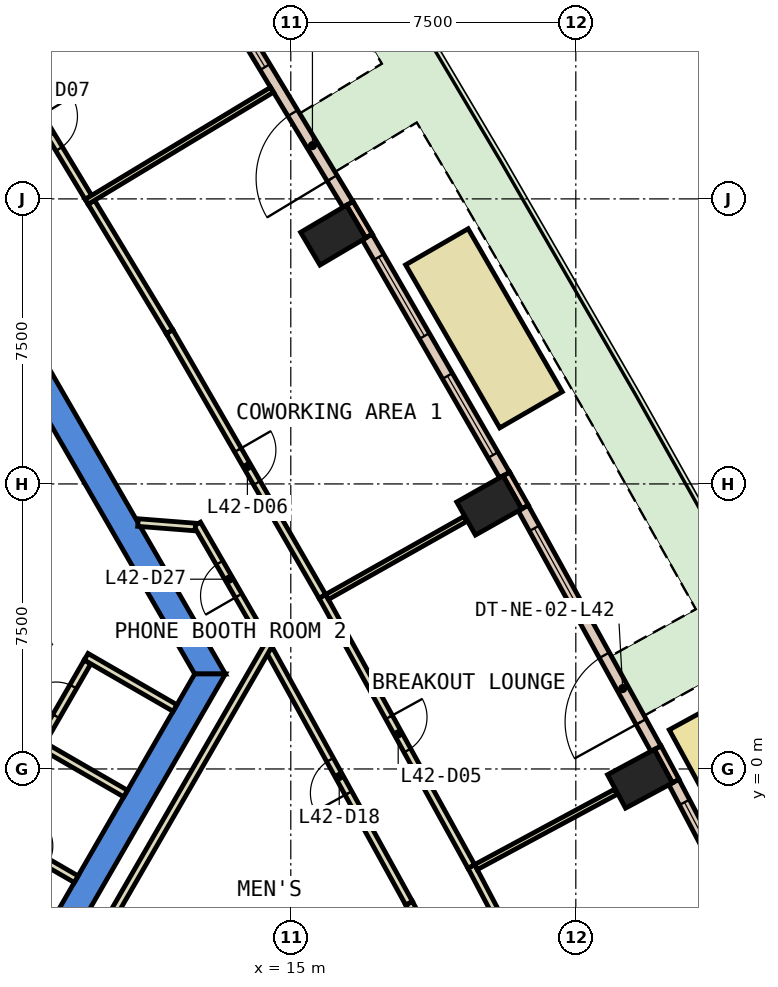
"""IFC4 building model, lengths in metres.
Left out: names, types, materials, properties, quantities, classifications, styles, units other than length and angle.
Written with IfcOpenShell. Run it as: python <this file> out.ifc"""

import sys

from ifc_helpers import new_model, si_unit, direction, frame, frame_2d, origin, origin_2d, place, context, subcontext, project, spatial, polyline, rectangle, outline, extrude, element, fill, save


model = new_model("IFC4")
c1 = context("Model", 3, precision=1e-05, world=origin(), true_north=direction((0.0, 1.0)))
c2 = subcontext(c1, "Body", "Model", "MODEL_VIEW")
j1 = project(units=[si_unit("LENGTHUNIT", "METRE"), si_unit("PLANEANGLEUNIT", "RADIAN")], contexts=[c1])
p1 = place(None, origin())
s1 = spatial("IfcSite", under=j1, at=p1, CompositionType="ELEMENT")
p2 = place(p1, origin())
s2 = spatial("IfcBuilding", under=s1, at=p2, CompositionType="ELEMENT")
p3 = place(p2, frame((0.0, 0.0, 189.8)))
s3 = spatial("IfcBuildingStorey", under=s2, at=p3, CompositionType="ELEMENT", Elevation=189.8)
for number, where, z_axis, x_axis in (
    (1, (24.188, -0.259, 0.0), (0.0, 0.0, 1.0), (-0.474, 0.88, 0.0)),
    (2, (20.222, 6.934, 0.0), (0.0, 0.0, 1.0), (-0.491, 0.871, 0.0)),
    (3, (16.116, 14.046, 0.0), (0.0, 0.0, 1.0), (-0.509, 0.861, 0.0)),
):
    element("IfcColumn", number, at=place(p3, frame(where, z_axis=z_axis, x_axis=x_axis)), inside=s3, PredefinedType="COLUMN", context=c2, shape_type="SweptSolid", body=[
        extrude(rectangle(XDim=1.0, YDim=1.4, at=origin_2d()), origin(), (0.0, 0.0, 1.0), 3.8),
    ])
p4 = place(p3, frame((0.0, 0.0, -0.6)))
e4 = element("IfcWall", 4, at=p4, inside=s3, PredefinedType="SHEAR", context=c2, shape_type="SweptSolid", body=[
    extrude(outline(polyline([(8.084, 11.498), (7.478, 11.148), (12.471, 2.5), (13.279, 2.5), (8.084, 11.498)])), origin(), (0.0, 0.0, 1.0), 4.4),
])
p5 = place(p3, frame((0.0, 0.0, -0.6)))
e5 = element("IfcWall", 5, at=p5, inside=s3, PredefinedType="SHEAR", context=c2, shape_type="SweptSolid", body=[
    extrude(outline(polyline([(6.64, -9.0), (13.279, 2.5), (12.471, 2.5), (6.235, -8.3), (6.64, -9.0)])), origin(), (0.0, 0.0, 1.0), 4.4),
])
p6 = place(p3, frame((25.129, -0.32, 0.0), z_axis=(0.0, 0.0, 1.0), x_axis=(-0.473663196434, 0.88070606694, 0.0)))
e6 = element("IfcWall", 6, at=p6, inside=s3, PredefinedType="STANDARD", context=c2, shape_type="SweptSolid", body=[
    extrude(rectangle(XDim=1.0, YDim=0.2, at=frame_2d((0.5, 0.0))), origin(), (0.0, 0.0, 1.0), 3.8),
])
p7 = place(p3, frame((21.165, 6.891, 0.0), z_axis=(0.0, 0.0, 1.0), x_axis=(-0.491848119507, 0.870681013539, 0.0)))
e7 = element("IfcWall", 7, at=p7, inside=s3, PredefinedType="STANDARD", context=c2, shape_type="SweptSolid", body=[
    extrude(rectangle(XDim=1.0, YDim=0.2, at=frame_2d((0.5, 0.0))), origin(), (0.0, 0.0, 1.0), 3.8),
])
p8 = place(p3, frame((17.059, 14.023, 0.0), z_axis=(0.0, 0.0, 1.0), x_axis=(-0.508161541526, 0.861261776531, 0.0)))
e8 = element("IfcWall", 8, at=p8, inside=s3, PredefinedType="STANDARD", context=c2, shape_type="SweptSolid", body=[
    extrude(rectangle(XDim=1.0, YDim=0.2, at=frame_2d((0.5, 0.0))), origin(), (0.0, 0.0, 1.0), 3.8),
])
p9 = place(p3, frame((28.435, -6.724, 0.0), z_axis=(0.0, 0.0, 1.0), x_axis=(-0.465478369088, 0.885059256723, 0.0)))
e9 = element("IfcWall", 9, at=p9, inside=s3, PredefinedType="STANDARD", context=c2, shape_type="SweptSolid", body=[
    extrude(rectangle(XDim=7.208, YDim=0.3, at=frame_2d((3.604, 0.0))), origin(), (0.0, 0.0, 1.0), 3.8),
])
p10 = place(p9, frame((0.602, 0.0, 0.9)))
e10 = element("IfcOpeningElement", 10, at=p10, cuts=e9, PredefinedType="OPENING", context=c2, shape_type="SweptSolid", body=[
    extrude(rectangle(XDim=2.4, YDim=2.6, at=frame_2d((1.2, 1.3))), frame((0.0, 0.16, 0.0), z_axis=(0.0, -1.0, 0.0), x_axis=(1.0, 0.0, 0.0)), (0.0, 0.0, 1.0), 0.32),
])
p11 = place(p9, frame((4.206, 0.0, 0.9)))
e11 = element("IfcOpeningElement", 11, at=p11, cuts=e9, PredefinedType="OPENING", context=c2, shape_type="SweptSolid", body=[
    extrude(rectangle(XDim=2.4, YDim=2.6, at=frame_2d((1.2, 1.3))), frame((0.0, 0.16, 0.0), z_axis=(0.0, -1.0, 0.0), x_axis=(1.0, 0.0, 0.0)), (0.0, 0.0, 1.0), 0.32),
])
p12 = place(p3, frame((24.607, 0.534, 0.0), z_axis=(0.0, 0.0, 1.0), x_axis=(-0.482862185961, 0.875696356832, 0.0)))
e12 = element("IfcWall", 12, at=p12, inside=s3, PredefinedType="STANDARD", context=c2, shape_type="SweptSolid", body=[
    extrude(rectangle(XDim=7.23, YDim=0.3, at=frame_2d((3.615, 0.0))), origin(), (0.0, 0.0, 1.0), 3.8),
])
p13 = place(p12, frame((0.807, 0.0, 0.0)))
e13 = element("IfcOpeningElement", 13, at=p13, cuts=e12, PredefinedType="OPENING", context=c2, shape_type="SweptSolid", body=[
    extrude(rectangle(XDim=2.0, YDim=2.4, at=frame_2d((1.0, 1.2))), frame((0.0, 0.16, 0.0), z_axis=(0.0, -1.0, 0.0), x_axis=(1.0, 0.0, 0.0)), (0.0, 0.0, 1.0), 0.32),
])
p14 = place(p12, frame((4.222, 0.0, 0.9)))
e14 = element("IfcOpeningElement", 14, at=p14, cuts=e12, PredefinedType="OPENING", context=c2, shape_type="SweptSolid", body=[
    extrude(rectangle(XDim=2.4, YDim=2.6, at=frame_2d((1.2, 1.3))), frame((0.0, 0.16, 0.0), z_axis=(0.0, -1.0, 0.0), x_axis=(1.0, 0.0, 0.0)), (0.0, 0.0, 1.0), 0.32),
])
p15 = place(p3, frame((20.626, 7.734, 0.0), z_axis=(0.0, 0.0, 1.0), x_axis=(-0.499948481376, 0.866055146033, 0.0)))
e15 = element("IfcWall", 15, at=p15, inside=s3, PredefinedType="STANDARD", context=c2, shape_type="SweptSolid", body=[
    extrude(rectangle(XDim=7.231, YDim=0.3, at=frame_2d((3.615, 0.0))), origin(), (0.0, 0.0, 1.0), 3.8),
])
p16 = place(p15, frame((0.608, 0.0, 0.9)))
e16 = element("IfcOpeningElement", 16, at=p16, cuts=e15, PredefinedType="OPENING", context=c2, shape_type="SweptSolid", body=[
    extrude(rectangle(XDim=2.4, YDim=2.6, at=frame_2d((1.2, 1.3))), frame((0.0, 0.16, 0.0), z_axis=(0.0, -1.0, 0.0), x_axis=(1.0, 0.0, 0.0)), (0.0, 0.0, 1.0), 0.32),
])
p17 = place(p15, frame((4.223, 0.0, 0.9)))
e17 = element("IfcOpeningElement", 17, at=p17, cuts=e15, PredefinedType="OPENING", context=c2, shape_type="SweptSolid", body=[
    extrude(rectangle(XDim=2.4, YDim=2.6, at=frame_2d((1.2, 1.3))), frame((0.0, 0.16, 0.0), z_axis=(0.0, -1.0, 0.0), x_axis=(1.0, 0.0, 0.0)), (0.0, 0.0, 1.0), 0.32),
])
p18 = place(p3, frame((16.504, 14.855, 0.0), z_axis=(0.0, 0.0, 1.0), x_axis=(-0.517159962006, 0.855888762456, 0.0)))
e18 = element("IfcWall", 18, at=p18, inside=s3, PredefinedType="STANDARD", context=c2, shape_type="SweptSolid", body=[
    extrude(rectangle(XDim=7.23, YDim=0.3, at=frame_2d((3.615, 0.0))), origin(), (0.0, 0.0, 1.0), 3.8),
])
p19 = place(p18, frame((0.807, 0.0, 0.0)))
e19 = element("IfcOpeningElement", 19, at=p19, cuts=e18, PredefinedType="OPENING", context=c2, shape_type="SweptSolid", body=[
    extrude(rectangle(XDim=2.0, YDim=2.4, at=frame_2d((1.0, 1.2))), frame((0.0, 0.16, 0.0), z_axis=(0.0, -1.0, 0.0), x_axis=(1.0, 0.0, 0.0)), (0.0, 0.0, 1.0), 0.32),
])
p20 = place(p18, frame((4.222, 0.0, 0.9)))
e20 = element("IfcOpeningElement", 20, at=p20, cuts=e18, PredefinedType="OPENING", context=c2, shape_type="SweptSolid", body=[
    extrude(rectangle(XDim=2.4, YDim=2.6, at=frame_2d((1.2, 1.3))), frame((0.0, 0.16, 0.0), z_axis=(0.0, -1.0, 0.0), x_axis=(1.0, 0.0, 0.0)), (0.0, 0.0, 1.0), 0.32),
])
p21 = place(p3, frame((28.168, -2.861, 0.0), z_axis=(0.0, 0.0, 1.0), x_axis=(-0.479445954257, 0.87757140846, 0.0)))
e21 = element("IfcWall", 21, at=p21, inside=s3, PredefinedType="STANDARD", context=c2, shape_type="SweptSolid", body=[
    extrude(rectangle(XDim=4.954, YDim=1.9, at=frame_2d((2.477, 0.0))), origin(), (0.0, 0.0, 1.0), 0.8),
])
p22 = place(p3, frame((21.321, 9.45, 0.0), z_axis=(0.0, 0.0, 1.0), x_axis=(-0.500029609304, 0.86600830817, 0.0)))
e22 = element("IfcWall", 22, at=p22, inside=s3, PredefinedType="STANDARD", context=c2, shape_type="SweptSolid", body=[
    extrude(rectangle(XDim=4.954, YDim=1.9, at=frame_2d((2.477, 0.0))), origin(), (0.0, 0.0, 1.0), 0.8),
])
p23 = place(p3, frame((14.213, 3.543, 0.0), z_axis=(0.0, 0.0, 1.0), x_axis=(-0.500182898346, 0.865919781621, 0.0)))
e23 = element("IfcWall", 23, at=p23, inside=s3, PredefinedType="PARTITIONING", context=c2, shape_type="SweptSolid", body=[
    extrude(rectangle(XDim=3.35, YDim=0.2, at=frame_2d((1.675, 0.0))), origin(), (0.0, 0.0, 1.0), 3.8),
])
p24 = place(p23, frame((1.175, 0.0, 0.0)))
e24 = element("IfcOpeningElement", 24, at=p24, cuts=e23, PredefinedType="OPENING", context=c2, shape_type="SweptSolid", body=[
    extrude(rectangle(XDim=1.0, YDim=2.1, at=frame_2d((0.5, 1.05))), frame((0.0, 0.11, 0.0), z_axis=(0.0, -1.0, 0.0), x_axis=(1.0, 0.0, 0.0)), (0.0, 0.0, 1.0), 0.22),
])
p25 = place(p3, frame((12.488, 6.366, 0.0), z_axis=(0.0, 0.0, 1.0), x_axis=(-0.996960771308, 0.077905201835, 0.0)))
e25 = element("IfcWall", 25, at=p25, inside=s3, PredefinedType="PARTITIONING", context=c2, shape_type="SweptSolid", body=[
    extrude(rectangle(XDim=1.514, YDim=0.2, at=frame_2d((0.757, 0.0))), origin(), (0.0, 0.0, 1.0), 3.8),
])
p26 = place(p3, frame((18.836, -4.906, 0.0), z_axis=(0.0, 0.0, 1.0), x_axis=(-0.465843561357, 0.884867095299, 0.0)))
e26 = element("IfcWall", 26, at=p26, inside=s3, PredefinedType="PARTITIONING", context=c2, shape_type="SweptSolid", body=[
    extrude(rectangle(XDim=1.554, YDim=0.2, at=frame_2d((0.777, 0.0))), origin(), (0.0, 0.0, 1.0), 3.8),
])
p27 = place(p3, frame((18.112, -3.531, 0.0), z_axis=(0.0, 0.0, 1.0), x_axis=(-0.482800061144, 0.875730609811, 0.0)))
e27 = element("IfcWall", 27, at=p27, inside=s3, PredefinedType="PARTITIONING", context=c2, shape_type="SweptSolid", body=[
    extrude(rectangle(XDim=7.612, YDim=0.2, at=frame_2d((3.806, 0.0))), origin(), (0.0, 0.0, 1.0), 3.8),
])
p28 = place(p27, frame((3.306, 0.0, 0.0)))
e28 = element("IfcOpeningElement", 28, at=p28, cuts=e27, PredefinedType="OPENING", context=c2, shape_type="SweptSolid", body=[
    extrude(rectangle(XDim=1.0, YDim=2.1, at=frame_2d((0.5, 1.05))), frame((0.0, 0.11, 0.0), z_axis=(0.0, -1.0, 0.0), x_axis=(1.0, 0.0, 0.0)), (0.0, 0.0, 1.0), 0.22),
])
p29 = place(p3, frame((19.75, -2.563, 0.0), z_axis=(0.0, 0.0, 1.0), x_axis=(0.465444987791, -0.885076812113, 0.0)))
e29 = element("IfcWall", 29, at=p29, inside=s3, PredefinedType="PARTITIONING", context=c2, shape_type="SweptSolid", body=[
    extrude(rectangle(XDim=7.578, YDim=0.2, at=frame_2d((3.789, 0.0))), origin(), (0.0, 0.0, 1.0), 3.8),
])
p30 = place(p29, frame((3.289, 0.0, 0.0)))
e30 = element("IfcOpeningElement", 30, at=p30, cuts=e29, PredefinedType="OPENING", context=c2, shape_type="SweptSolid", body=[
    extrude(rectangle(XDim=1.0, YDim=2.1, at=frame_2d((0.5, 1.05))), frame((0.0, 0.11, 0.0), z_axis=(0.0, -1.0, 0.0), x_axis=(1.0, 0.0, 0.0)), (0.0, 0.0, 1.0), 0.22),
])
p31 = place(p3, frame((15.831, 4.542, 0.0), z_axis=(0.0, 0.0, 1.0), x_axis=(0.482835531749, -0.875711053533, 0.0)))
e31 = element("IfcWall", 31, at=p31, inside=s3, PredefinedType="PARTITIONING", context=c2, shape_type="SweptSolid", body=[
    extrude(rectangle(XDim=8.115, YDim=0.2, at=frame_2d((4.057, 0.0))), origin(), (0.0, 0.0, 1.0), 3.8),
])
p32 = place(p31, frame((3.632, 0.0, 0.0)))
e32 = element("IfcOpeningElement", 32, at=p32, cuts=e31, PredefinedType="OPENING", context=c2, shape_type="SweptSolid", body=[
    extrude(rectangle(XDim=1.0, YDim=2.1, at=frame_2d((0.5, 1.05))), frame((0.0, 0.11, 0.0), z_axis=(0.0, -1.0, 0.0), x_axis=(1.0, 0.0, 0.0)), (0.0, 0.0, 1.0), 0.22),
])
p33 = place(p3, frame((9.752, 14.911, 0.0), z_axis=(0.0, 0.0, 1.0), x_axis=(0.517135291957, -0.855903668535, 0.0)))
e33 = element("IfcWall", 33, at=p33, inside=s3, PredefinedType="PARTITIONING", context=c2, shape_type="SweptSolid", body=[
    extrude(rectangle(XDim=3.982, YDim=0.2, at=frame_2d((1.991, 0.0))), origin(), (0.0, 0.0, 1.0), 3.8),
])
p34 = place(p3, frame((11.811, 11.503, 0.0), z_axis=(0.0, 0.0, 1.0), x_axis=(0.500013420409, -0.866017655369, 0.0)))
e34 = element("IfcWall", 34, at=p34, inside=s3, PredefinedType="PARTITIONING", context=c2, shape_type="SweptSolid", body=[
    extrude(rectangle(XDim=8.038, YDim=0.2, at=frame_2d((4.019, 0.0))), origin(), (0.0, 0.0, 1.0), 3.8),
])
p35 = place(p34, frame((3.594, 0.0, 0.0)))
e35 = element("IfcOpeningElement", 35, at=p35, cuts=e34, PredefinedType="OPENING", context=c2, shape_type="SweptSolid", body=[
    extrude(rectangle(XDim=1.0, YDim=2.1, at=frame_2d((0.5, 1.05))), frame((0.0, 0.11, 0.0), z_axis=(0.0, -1.0, 0.0), x_axis=(1.0, 0.0, 0.0)), (0.0, 0.0, 1.0), 0.22),
])
p36 = place(p3, frame((7.615, 18.449, 0.0), z_axis=(0.0, 0.0, 1.0), x_axis=(0.516918251554, -0.856034766356, 0.0)))
e36 = element("IfcWall", 36, at=p36, inside=s3, PredefinedType="PARTITIONING", context=c2, shape_type="SweptSolid", body=[
    extrude(rectangle(XDim=3.983, YDim=0.2, at=frame_2d((1.992, 0.0))), origin(), (0.0, 0.0, 1.0), 3.8),
])
p37 = place(p36, frame((1.492, 0.0, 0.0)))
e37 = element("IfcOpeningElement", 37, at=p37, cuts=e36, PredefinedType="OPENING", context=c2, shape_type="SweptSolid", body=[
    extrude(rectangle(XDim=1.0, YDim=2.1, at=frame_2d((0.5, 1.05))), frame((0.0, 0.11, 0.0), z_axis=(0.0, -1.0, 0.0), x_axis=(1.0, 0.0, 0.0)), (0.0, 0.0, 1.0), 0.22),
])
p38 = place(p3, frame((7.188, -1.65, 0.0), z_axis=(0.0, 0.0, 1.0), x_axis=(0.866022959057, -0.500004234368, 0.0)))
e38 = element("IfcWall", 38, at=p38, inside=s3, PredefinedType="PARTITIONING", context=c2, shape_type="SweptSolid", body=[
    extrude(rectangle(XDim=2.5, YDim=0.2, at=frame_2d((1.25, 0.0))), origin(), (0.0, 0.0, 1.0), 3.8),
])
p39 = place(p38, frame((0.75, 0.0, 0.0)))
e39 = element("IfcOpeningElement", 39, at=p39, cuts=e38, PredefinedType="OPENING", context=c2, shape_type="SweptSolid", body=[
    extrude(rectangle(XDim=0.9, YDim=2.1, at=frame_2d((0.45, 1.05))), frame((0.0, 0.11, 0.0), z_axis=(0.0, -1.0, 0.0), x_axis=(1.0, 0.0, 0.0)), (0.0, 0.0, 1.0), 0.22),
])
p40 = place(p3, frame((10.653, -0.648, 0.0), z_axis=(0.0, 0.0, 1.0), x_axis=(-0.866036505625, 0.499980770555, 0.0)))
e40 = element("IfcWall", 40, at=p40, inside=s3, PredefinedType="PARTITIONING", context=c2, shape_type="SweptSolid", body=[
    extrude(rectangle(XDim=2.7, YDim=0.2, at=frame_2d((1.35, 0.0))), origin(), (0.0, 0.0, 1.0), 3.8),
])
p41 = place(p3, frame((8.451, 0.738, 0.0), z_axis=(0.0, 0.0, 1.0), x_axis=(0.499913221443, 0.866075499611, 0.0)))
e41 = element("IfcWall", 41, at=p41, inside=s3, PredefinedType="PARTITIONING", context=c2, shape_type="SweptSolid", body=[
    extrude(rectangle(XDim=2.4, YDim=0.2, at=frame_2d((1.2, 0.0))), origin(), (0.0, 0.0, 1.0), 3.8),
])
p42 = place(p41, frame((0.75, 0.0, 0.0)))
e42 = element("IfcOpeningElement", 42, at=p42, cuts=e41, PredefinedType="OPENING", context=c2, shape_type="SweptSolid", body=[
    extrude(rectangle(XDim=0.9, YDim=2.1, at=frame_2d((0.45, 1.05))), frame((0.0, 0.11, 0.0), z_axis=(0.0, -1.0, 0.0), x_axis=(1.0, 0.0, 0.0)), (0.0, 0.0, 1.0), 0.22),
])
p43 = place(p3, frame((9.615, 2.953, 0.0), z_axis=(0.0, 0.0, 1.0), x_axis=(0.866013897511, -0.50001992892, 0.0)))
e43 = element("IfcWall", 43, at=p43, inside=s3, PredefinedType="PARTITIONING", context=c2, shape_type="SweptSolid", body=[
    extrude(rectangle(XDim=2.7, YDim=0.2, at=frame_2d((1.35, 0.0))), origin(), (0.0, 0.0, 1.0), 3.8),
])
p44 = place(p3, frame((9.781, -4.758, 0.0), z_axis=(0.0, 0.0, 1.0), x_axis=(0.50003174578, 0.866007074574, 0.0)))
e44 = element("IfcWall", 44, at=p44, inside=s3, PredefinedType="PARTITIONING", context=c2, shape_type="SweptSolid", body=[
    extrude(rectangle(XDim=9.315, YDim=0.2, at=frame_2d((4.658, 0.0))), origin(), (0.0, 0.0, 1.0), 3.8),
])
p45 = place(p3, frame((19.873, -2.582, 0.0), z_axis=(0.0, 0.0, 1.0), x_axis=(0.880480475723, 0.474082410421, 0.0)))
e45 = element("IfcWall", 45, at=p45, inside=s3, PredefinedType="PARTITIONING", context=c2, shape_type="SweptSolid", body=[
    extrude(rectangle(XDim=4.181, YDim=0.15, at=frame_2d((2.09, 0.0))), origin(), (0.0, 0.0, 1.0), 3.8),
])
p46 = place(p3, frame((15.954, 4.526, 0.0), z_axis=(0.0, 0.0, 1.0), x_axis=(0.870940016277, 0.491389344663, 0.0)))
e46 = element("IfcWall", 46, at=p46, inside=s3, PredefinedType="PARTITIONING", context=c2, shape_type="SweptSolid", body=[
    extrude(rectangle(XDim=4.18, YDim=0.15, at=frame_2d((2.09, 0.0))), origin(), (0.0, 0.0, 1.0), 3.8),
])
p47 = place(p3, frame((9.628, 14.924, 0.0), z_axis=(0.0, 0.0, 1.0), x_axis=(0.855931736607, 0.517088834021, 0.0)))
e47 = element("IfcWall", 47, at=p47, inside=s3, PredefinedType="PARTITIONING", context=c2, shape_type="SweptSolid", body=[
    extrude(rectangle(XDim=5.699, YDim=0.15, at=frame_2d((2.85, 0.0))), origin(), (0.0, 0.0, 1.0), 3.8),
])
p48 = place(p11, origin())
e48 = element("IfcWindow", 48, at=p48, inside=s3, PartitioningType="SINGLE_PANEL", PredefinedType="WINDOW", context=c2, shape_type="SweptSolid", body=[
    extrude(rectangle(XDim=2.4, YDim=2.6, at=frame_2d((1.2, 1.3))), frame((0.0, 0.03, 0.0), z_axis=(0.0, -1.0, 0.0), x_axis=(1.0, 0.0, 0.0)), (0.0, 0.0, 1.0), 0.06),
])
fill(e11, e48)
p49 = place(p13, origin())
e49 = element("IfcDoor", 49, at=p49, inside=s3, OperationType="SLIDING_TO_LEFT", PredefinedType="DOOR", context=c2, shape_type="SweptSolid", body=[
    extrude(rectangle(XDim=2.0, YDim=2.4, at=frame_2d((1.0, 1.2))), frame((0.0, 0.025, 0.0), z_axis=(0.0, -1.0, 0.0), x_axis=(1.0, 0.0, 0.0)), (0.0, 0.0, 1.0), 0.05),
])
fill(e13, e49)
p50 = place(p14, origin())
e50 = element("IfcWindow", 50, at=p50, inside=s3, PartitioningType="SINGLE_PANEL", PredefinedType="WINDOW", context=c2, shape_type="SweptSolid", body=[
    extrude(rectangle(XDim=2.4, YDim=2.6, at=frame_2d((1.2, 1.3))), frame((0.0, 0.03, 0.0), z_axis=(0.0, -1.0, 0.0), x_axis=(1.0, 0.0, 0.0)), (0.0, 0.0, 1.0), 0.06),
])
fill(e14, e50)
p51 = place(p16, origin())
e51 = element("IfcWindow", 51, at=p51, inside=s3, PartitioningType="SINGLE_PANEL", PredefinedType="WINDOW", context=c2, shape_type="SweptSolid", body=[
    extrude(rectangle(XDim=2.4, YDim=2.6, at=frame_2d((1.2, 1.3))), frame((0.0, 0.03, 0.0), z_axis=(0.0, -1.0, 0.0), x_axis=(1.0, 0.0, 0.0)), (0.0, 0.0, 1.0), 0.06),
])
fill(e16, e51)
p52 = place(p17, origin())
e52 = element("IfcWindow", 52, at=p52, inside=s3, PartitioningType="SINGLE_PANEL", PredefinedType="WINDOW", context=c2, shape_type="SweptSolid", body=[
    extrude(rectangle(XDim=2.4, YDim=2.6, at=frame_2d((1.2, 1.3))), frame((0.0, 0.03, 0.0), z_axis=(0.0, -1.0, 0.0), x_axis=(1.0, 0.0, 0.0)), (0.0, 0.0, 1.0), 0.06),
])
fill(e17, e52)
p53 = place(p19, origin())
e53 = element("IfcDoor", 53, at=p53, inside=s3, OperationType="SLIDING_TO_LEFT", PredefinedType="DOOR", context=c2, shape_type="SweptSolid", body=[
    extrude(rectangle(XDim=2.0, YDim=2.4, at=frame_2d((1.0, 1.2))), frame((0.0, 0.025, 0.0), z_axis=(0.0, -1.0, 0.0), x_axis=(1.0, 0.0, 0.0)), (0.0, 0.0, 1.0), 0.05),
])
fill(e19, e53)
p54 = place(p20, origin())
e54 = element("IfcWindow", 54, at=p54, inside=s3, PartitioningType="SINGLE_PANEL", PredefinedType="WINDOW", context=c2, shape_type="SweptSolid", body=[
    extrude(rectangle(XDim=2.4, YDim=2.6, at=frame_2d((1.2, 1.3))), frame((0.0, 0.03, 0.0), z_axis=(0.0, -1.0, 0.0), x_axis=(1.0, 0.0, 0.0)), (0.0, 0.0, 1.0), 0.06),
])
fill(e20, e54)
p55 = place(p32, origin())
e55 = element("IfcDoor", 55, at=p55, inside=s3, OperationType="SINGLE_SWING_RIGHT", PredefinedType="DOOR", context=c2, shape_type="SweptSolid", body=[
    extrude(rectangle(XDim=1.0, YDim=2.1, at=frame_2d((0.5, 1.05))), frame((0.0, 0.025, 0.0), z_axis=(0.0, -1.0, 0.0), x_axis=(1.0, 0.0, 0.0)), (0.0, 0.0, 1.0), 0.05),
])
fill(e32, e55)
p56 = place(p35, origin())
e56 = element("IfcDoor", 56, at=p56, inside=s3, OperationType="SINGLE_SWING_LEFT", PredefinedType="DOOR", context=c2, shape_type="SweptSolid", body=[
    extrude(rectangle(XDim=1.0, YDim=2.1, at=frame_2d((0.5, 1.05))), frame((0.0, 0.025, 0.0), z_axis=(0.0, -1.0, 0.0), x_axis=(1.0, 0.0, 0.0)), (0.0, 0.0, 1.0), 0.05),
])
fill(e35, e56)
p57 = place(p37, origin())
e57 = element("IfcDoor", 57, at=p57, inside=s3, OperationType="SINGLE_SWING_LEFT", PredefinedType="DOOR", context=c2, shape_type="SweptSolid", body=[
    extrude(rectangle(XDim=1.0, YDim=2.1, at=frame_2d((0.5, 1.05))), frame((0.0, 0.025, 0.0), z_axis=(0.0, -1.0, 0.0), x_axis=(1.0, 0.0, 0.0)), (0.0, 0.0, 1.0), 0.05),
])
fill(e37, e57)
p58 = place(p28, origin())
e58 = element("IfcDoor", 58, at=p58, inside=s3, OperationType="SINGLE_SWING_LEFT", PredefinedType="DOOR", context=c2, shape_type="SweptSolid", body=[
    extrude(rectangle(XDim=1.0, YDim=2.1, at=frame_2d((0.5, 1.05))), frame((0.0, 0.025, 0.0), z_axis=(0.0, -1.0, 0.0), x_axis=(1.0, 0.0, 0.0)), (0.0, 0.0, 1.0), 0.05),
])
fill(e28, e58)
p59 = place(p24, origin())
e59 = element("IfcDoor", 59, at=p59, inside=s3, OperationType="SINGLE_SWING_LEFT", PredefinedType="DOOR", context=c2, shape_type="SweptSolid", body=[
    extrude(rectangle(XDim=1.0, YDim=2.1, at=frame_2d((0.5, 1.05))), frame((0.0, 0.025, 0.0), z_axis=(0.0, -1.0, 0.0), x_axis=(1.0, 0.0, 0.0)), (0.0, 0.0, 1.0), 0.05),
])
fill(e24, e59)
p60 = place(p42, origin())
e60 = element("IfcDoor", 60, at=p60, inside=s3, OperationType="SINGLE_SWING_LEFT", PredefinedType="DOOR", context=c2, shape_type="SweptSolid", body=[
    extrude(rectangle(XDim=0.9, YDim=2.1, at=frame_2d((0.45, 1.05))), frame((0.0, 0.025, 0.0), z_axis=(0.0, -1.0, 0.0), x_axis=(1.0, 0.0, 0.0)), (0.0, 0.0, 1.0), 0.05),
])
fill(e42, e60)
save(model, sys.argv[1])
